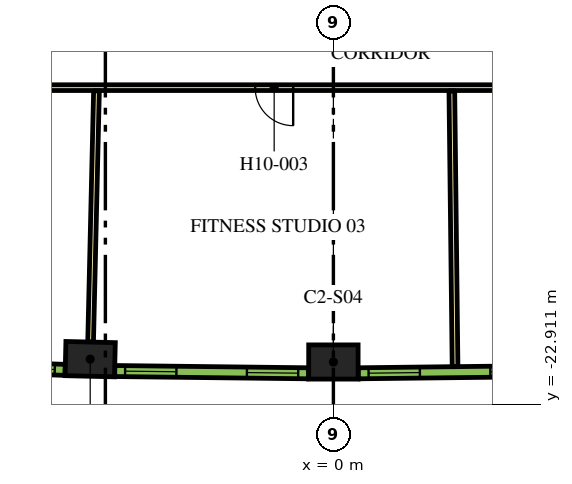
"""IFC4 building model, lengths in metres.
Left out: names, types, materials, properties, quantities, classifications, styles, units other than length and angle.
Written with IfcOpenShell. Run it as: python <this file> out.ifc"""

import sys

from ifc_helpers import new_model, si_unit, direction, frame, frame_2d, origin, origin_2d, place, context, subcontext, project, spatial, rectangle, extrude, element, fill, save


model = new_model("IFC4")
c1 = context("Model", 3, precision=1e-05, world=origin(), true_north=direction((0.0, 1.0)))
c2 = subcontext(c1, "Body", "Model", "MODEL_VIEW")
j1 = project(units=[si_unit("LENGTHUNIT", "METRE"), si_unit("PLANEANGLEUNIT", "RADIAN")], contexts=[c1])
p1 = place(None, origin())
s1 = spatial("IfcSite", under=j1, at=p1, CompositionType="ELEMENT")
p2 = place(p1, origin())
s2 = spatial("IfcBuilding", under=s1, at=p2, CompositionType="ELEMENT")
p3 = place(p2, frame((0.0, 0.0, 130.5)))
s3 = spatial("IfcBuildingStorey", under=s2, at=p3, CompositionType="ELEMENT", Elevation=130.5)
for number, where, z_axis, x_axis in (
    (1, (-6.399, -21.719, 0.0), (0.0, 0.0, 1.0), (1.0, -0.023, 0.0)),
    (2, (0.0, -21.794, 0.0), (0.0, 0.0, 1.0), (1.0, 0.0, 0.0)),
):
    element("IfcColumn", number, at=place(p3, frame(where, z_axis=z_axis, x_axis=x_axis)), inside=s3, PredefinedType="COLUMN", context=c2, shape_type="SweptSolid", body=[
        extrude(rectangle(XDim=1.3, YDim=0.9, at=origin_2d()), origin(), (0.0, 0.0, 1.0), 3.9),
    ])
p4 = place(p3, frame((12.918, -14.575, 0.0), z_axis=(0.0, 0.0, 1.0), x_axis=(-1.0, 0.0, 0.0)))
e3 = element("IfcWall", 3, at=p4, inside=s3, PredefinedType="PARTITIONING", context=c2, shape_type="SweptSolid", body=[
    extrude(rectangle(XDim=25.766, YDim=0.15, at=frame_2d((12.883, 0.0))), origin(), (0.0, 0.0, 1.0), 2.6),
])
p5 = place(p4, frame((21.946, 0.0, 0.0)))
e4 = element("IfcOpeningElement", 4, at=p5, cuts=e3, PredefinedType="OPENING", context=c2, shape_type="SweptSolid", body=[
    extrude(rectangle(XDim=1.0, YDim=2.1, at=frame_2d((0.5, 1.05))), frame((0.0, 0.085, 0.0), z_axis=(0.0, -1.0, 0.0), x_axis=(1.0, 0.0, 0.0)), (0.0, 0.0, 1.0), 0.17),
])
p6 = place(p4, frame((13.977, 0.0, 0.0)))
e5 = element("IfcOpeningElement", 5, at=p6, cuts=e3, PredefinedType="OPENING", context=c2, shape_type="SweptSolid", body=[
    extrude(rectangle(XDim=1.0, YDim=2.1, at=frame_2d((0.5, 1.05))), frame((0.0, 0.085, 0.0), z_axis=(0.0, -1.0, 0.0), x_axis=(1.0, 0.0, 0.0)), (0.0, 0.0, 1.0), 0.17),
])
p7 = place(p4, frame((4.622, 0.0, 0.0)))
e6 = element("IfcOpeningElement", 6, at=p7, cuts=e3, PredefinedType="OPENING", context=c2, shape_type="SweptSolid", body=[
    extrude(rectangle(XDim=1.0, YDim=2.1, at=frame_2d((0.5, 1.05))), frame((0.0, 0.085, 0.0), z_axis=(0.0, -1.0, 0.0), x_axis=(1.0, 0.0, 0.0)), (0.0, 0.0, 1.0), 0.17),
])
p8 = place(p3, frame((-6.389, -21.269, 0.0), z_axis=(0.0, 0.0, 1.0), x_axis=(0.023377429176, 0.999726710559, 0.0)))
e7 = element("IfcWall", 7, at=p8, inside=s3, PredefinedType="PARTITIONING", context=c2, shape_type="SweptSolid", body=[
    extrude(rectangle(XDim=6.611, YDim=0.15, at=frame_2d((3.305, 0.0))), origin(), (0.0, 0.0, 1.0), 2.6),
])
p9 = place(p3, frame((3.202, -21.916, 0.0), z_axis=(0.0, 0.0, 1.0), x_axis=(-0.011707696285, 0.999931462575, 0.0)))
e8 = element("IfcWall", 8, at=p9, inside=s3, PredefinedType="PARTITIONING", context=c2, shape_type="SweptSolid", body=[
    extrude(rectangle(XDim=7.257, YDim=0.15, at=frame_2d((3.628, 0.0))), origin(), (0.0, 0.0, 1.0), 2.6),
])
p10 = place(p3, frame((-12.157, -21.822, 0.0), z_axis=(0.0, 0.0, 1.0), x_axis=(0.999385993957, -0.035037623812, 0.0)))
e9 = element("IfcWall", 9, at=p10, inside=s3, PredefinedType="SOLIDWALL", context=c2, shape_type="SweptSolid", body=[
    extrude(rectangle(XDim=5.101, YDim=0.29, at=frame_2d((2.55, 0.0))), origin(), (0.0, 0.0, 1.0), 3.5),
])
p11 = place(p10, frame((0.273, 0.0, 0.9)))
e10 = element("IfcOpeningElement", 10, at=p11, cuts=e9, PredefinedType="OPENING", context=c2, shape_type="SweptSolid", body=[
    extrude(rectangle(XDim=1.35, YDim=2.15, at=frame_2d((0.675, 1.075))), frame((0.0, 0.155, 0.0), z_axis=(0.0, -1.0, 0.0), x_axis=(1.0, 0.0, 0.0)), (0.0, 0.0, 1.0), 0.31),
])
p12 = place(p10, frame((3.478, 0.0, 0.9)))
e11 = element("IfcOpeningElement", 11, at=p12, cuts=e9, PredefinedType="OPENING", context=c2, shape_type="SweptSolid", body=[
    extrude(rectangle(XDim=1.35, YDim=2.15, at=frame_2d((0.675, 1.075))), frame((0.0, 0.155, 0.0), z_axis=(0.0, -1.0, 0.0), x_axis=(1.0, 0.0, 0.0)), (0.0, 0.0, 1.0), 0.31),
])
p13 = place(p3, frame((-5.753, -22.031, 0.0), z_axis=(0.0, 0.0, 1.0), x_axis=(0.999931786565, -0.011679992145, 0.0)))
e12 = element("IfcWall", 12, at=p13, inside=s3, PredefinedType="SOLIDWALL", context=c2, shape_type="SweptSolid", body=[
    extrude(rectangle(XDim=5.1, YDim=0.29, at=frame_2d((2.55, 0.0))), origin(), (0.0, 0.0, 1.0), 3.5),
])
p14 = place(p13, frame((0.272, 0.0, 0.9)))
e13 = element("IfcOpeningElement", 13, at=p14, cuts=e12, PredefinedType="OPENING", context=c2, shape_type="SweptSolid", body=[
    extrude(rectangle(XDim=1.35, YDim=2.15, at=frame_2d((0.675, 1.075))), frame((0.0, 0.155, 0.0), z_axis=(0.0, -1.0, 0.0), x_axis=(1.0, 0.0, 0.0)), (0.0, 0.0, 1.0), 0.31),
])
p15 = place(p13, frame((3.478, 0.0, 0.9)))
e14 = element("IfcOpeningElement", 14, at=p15, cuts=e12, PredefinedType="OPENING", context=c2, shape_type="SweptSolid", body=[
    extrude(rectangle(XDim=1.35, YDim=2.15, at=frame_2d((0.675, 1.075))), frame((0.0, 0.155, 0.0), z_axis=(0.0, -1.0, 0.0), x_axis=(1.0, 0.0, 0.0)), (0.0, 0.0, 1.0), 0.31),
])
p16 = place(p3, frame((0.653, -22.091, 0.0), z_axis=(0.0, 0.0, 1.0), x_axis=(0.999931786565, 0.011679992145, 0.0)))
e15 = element("IfcWall", 15, at=p16, inside=s3, PredefinedType="SOLIDWALL", context=c2, shape_type="SweptSolid", body=[
    extrude(rectangle(XDim=5.1, YDim=0.29, at=frame_2d((2.55, 0.0))), origin(), (0.0, 0.0, 1.0), 3.5),
])
p17 = place(p16, frame((0.273, 0.0, 0.9)))
e16 = element("IfcOpeningElement", 16, at=p17, cuts=e15, PredefinedType="OPENING", context=c2, shape_type="SweptSolid", body=[
    extrude(rectangle(XDim=1.35, YDim=2.15, at=frame_2d((0.675, 1.075))), frame((0.0, 0.155, 0.0), z_axis=(0.0, -1.0, 0.0), x_axis=(1.0, 0.0, 0.0)), (0.0, 0.0, 1.0), 0.31),
])
p18 = place(p16, frame((3.478, 0.0, 0.9)))
e17 = element("IfcOpeningElement", 17, at=p18, cuts=e15, PredefinedType="OPENING", context=c2, shape_type="SweptSolid", body=[
    extrude(rectangle(XDim=1.35, YDim=2.15, at=frame_2d((0.675, 1.075))), frame((0.0, 0.155, 0.0), z_axis=(0.0, -1.0, 0.0), x_axis=(1.0, 0.0, 0.0)), (0.0, 0.0, 1.0), 0.31),
])
p19 = place(p6, origin())
e18 = element("IfcDoor", 18, at=p19, inside=s3, OperationType="SINGLE_SWING_LEFT", PredefinedType="DOOR", context=c2, shape_type="SweptSolid", body=[
    extrude(rectangle(XDim=1.0, YDim=2.1, at=frame_2d((0.5, 1.05))), frame((0.0, 0.025, 0.0), z_axis=(0.0, -1.0, 0.0), x_axis=(1.0, 0.0, 0.0)), (0.0, 0.0, 1.0), 0.05),
])
fill(e5, e18)
p20 = place(p12, origin())
e19 = element("IfcWindow", 19, at=p20, inside=s3, PartitioningType="DOUBLE_PANEL_VERTICAL", PredefinedType="WINDOW", context=c2, shape_type="SweptSolid", body=[
    extrude(rectangle(XDim=1.35, YDim=2.15, at=frame_2d((0.675, 1.075))), frame((0.0, 0.015, 0.0), z_axis=(0.0, -1.0, 0.0), x_axis=(1.0, 0.0, 0.0)), (0.0, 0.0, 1.0), 0.06),
])
fill(e11, e19)
p21 = place(p14, origin())
e20 = element("IfcWindow", 20, at=p21, inside=s3, PartitioningType="DOUBLE_PANEL_VERTICAL", PredefinedType="WINDOW", context=c2, shape_type="SweptSolid", body=[
    extrude(rectangle(XDim=1.35, YDim=2.15, at=frame_2d((0.675, 1.075))), frame((0.0, 0.015, 0.0), z_axis=(0.0, -1.0, 0.0), x_axis=(1.0, 0.0, 0.0)), (0.0, 0.0, 1.0), 0.06),
])
fill(e13, e20)
p22 = place(p15, origin())
e21 = element("IfcWindow", 21, at=p22, inside=s3, PartitioningType="DOUBLE_PANEL_VERTICAL", PredefinedType="WINDOW", context=c2, shape_type="SweptSolid", body=[
    extrude(rectangle(XDim=1.35, YDim=2.15, at=frame_2d((0.675, 1.075))), frame((0.0, 0.015, 0.0), z_axis=(0.0, -1.0, 0.0), x_axis=(1.0, 0.0, 0.0)), (0.0, 0.0, 1.0), 0.06),
])
fill(e14, e21)
p23 = place(p17, origin())
e22 = element("IfcWindow", 22, at=p23, inside=s3, PartitioningType="DOUBLE_PANEL_VERTICAL", PredefinedType="WINDOW", context=c2, shape_type="SweptSolid", body=[
    extrude(rectangle(XDim=1.35, YDim=2.15, at=frame_2d((0.675, 1.075))), frame((0.0, 0.015, 0.0), z_axis=(0.0, -1.0, 0.0), x_axis=(1.0, 0.0, 0.0)), (0.0, 0.0, 1.0), 0.06),
])
fill(e16, e22)
p24 = place(p18, origin())
e23 = element("IfcWindow", 23, at=p24, inside=s3, PartitioningType="DOUBLE_PANEL_VERTICAL", PredefinedType="WINDOW", context=c2, shape_type="SweptSolid", body=[
    extrude(rectangle(XDim=1.35, YDim=2.15, at=frame_2d((0.675, 1.075))), frame((0.0, 0.015, 0.0), z_axis=(0.0, -1.0, 0.0), x_axis=(1.0, 0.0, 0.0)), (0.0, 0.0, 1.0), 0.06),
])
fill(e17, e23)
save(model, sys.argv[1])
